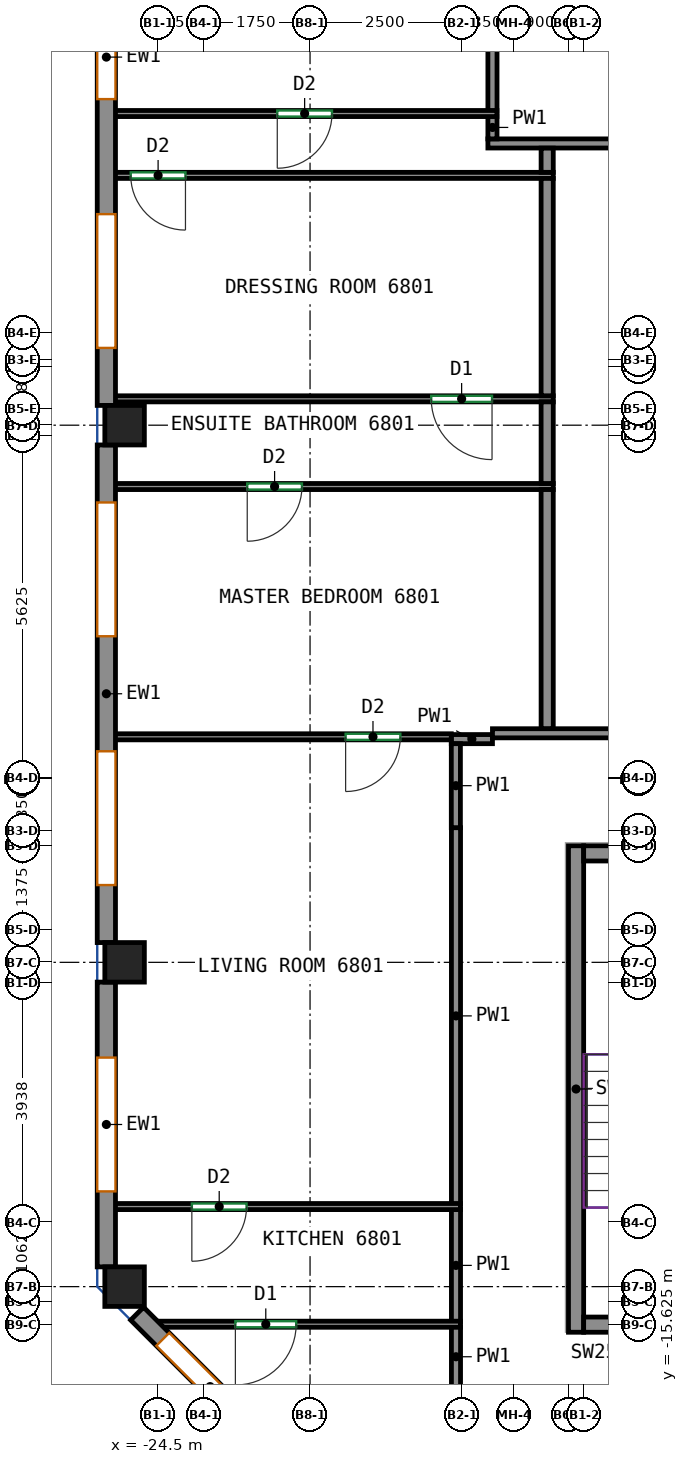
"""IFC4 building model, lengths in metres.
Left out: names, types, materials, properties, quantities, classifications, styles, units other than length and angle.
Written with IfcOpenShell. Run it as: python <this file> out.ifc"""

import sys

from ifc_helpers import new_model, si_unit, direction, frame, frame_2d, origin, origin_2d, place, context, subcontext, project, spatial, rectangle, extrude, source, transform, mapped, element, fill, save


model = new_model("IFC4")
c1 = context("Model", 3, precision=1e-05, world=origin(), true_north=direction((0.0, 1.0)))
c2 = subcontext(c1, "Body", "Model", "MODEL_VIEW")
j1 = project(units=[si_unit("LENGTHUNIT", "METRE"), si_unit("PLANEANGLEUNIT", "RADIAN")], contexts=[c1])
p1 = place(None, origin())
s1 = spatial("IfcSite", under=j1, at=p1, CompositionType="ELEMENT")
p2 = place(p1, origin())
s2 = spatial("IfcBuilding", under=s1, at=p2, CompositionType="ELEMENT")
p3 = place(p2, frame((0.0, 0.0, 277.2)))
s3 = spatial("IfcBuildingStorey", under=s2, at=p3, CompositionType="ELEMENT", Elevation=277.2)
m1 = source(origin(), c2, "Body", "SweptSolid", [
    extrude(rectangle(XDim=0.65, YDim=0.65, at=origin_2d()), origin(), (0.0, 0.0, 1.0), 3.12),
])
for number, where, z_axis, x_axis in (
    (1, (-25.05, -15.0, 0.0), (0.0, 0.0, 1.0), (1.0, 0.0, 0.0)),
    (2, (-25.05, -9.667, 0.0), (0.0, 0.0, 1.0), (1.0, 0.0, 0.0)),
    (3, (-25.05, -0.833, 0.0), (0.0, 0.0, 1.0), (1.0, 0.0, 0.0)),
):
    element("IfcColumn", number, at=place(p3, frame(where, z_axis=z_axis, x_axis=x_axis)), inside=s3, PredefinedType="COLUMN", context=c2, shape_type="MappedRepresentation", body=[
        mapped(m1, transform((0.0, 0.0, 0.0))),
    ])
m2 = source(origin(), c2, "Body", "SweptSolid", [
    extrude(rectangle(XDim=8.0, YDim=0.25, at=frame_2d((4.0, 0.0))), origin(), (0.0, 0.0, 1.0), 3.12),
])
p4 = place(p3, frame((-17.625, -15.75, 0.0), z_axis=(0.0, 0.0, 1.0), x_axis=(0.0, 1.0, 0.0)))
e4 = element("IfcWall", 4, at=p4, inside=s3, PredefinedType="SHEAR", context=c2, shape_type="MappedRepresentation", body=[
    mapped(m2, transform((0.0, 0.0, 0.0))),
])
m3 = source(origin(), c2, "Body", "SweptSolid", [
    extrude(rectangle(XDim=3.7, YDim=0.25, at=frame_2d((1.85, 0.0))), origin(), (0.0, 0.0, 1.0), 3.12),
])
p5 = place(p3, frame((-17.5, -15.625, 0.0), z_axis=(0.0, 0.0, 1.0), x_axis=(1.0, 0.0, 0.0)))
e5 = element("IfcWall", 5, at=p5, inside=s3, PredefinedType="SHEAR", context=c2, shape_type="MappedRepresentation", body=[
    mapped(m3, transform((0.0, 0.0, 0.0))),
])
p6 = place(p5, frame((1.25, 0.0, 0.0)))
e6 = element("IfcOpeningElement", 6, at=p6, cuts=e5, PredefinedType="OPENING", context=c2, shape_type="SweptSolid", body=[
    extrude(rectangle(XDim=1.2, YDim=2.1, at=frame_2d((0.6, 1.05))), frame((0.0, 0.135, 0.0), z_axis=(0.0, -1.0, 0.0), x_axis=(1.0, 0.0, 0.0)), (0.0, 0.0, 1.0), 0.27),
])
p7 = place(p3, frame((-17.5, -7.875, 0.0), z_axis=(0.0, 0.0, 1.0), x_axis=(1.0, 0.0, 0.0)))
e7 = element("IfcWall", 7, at=p7, inside=s3, PredefinedType="SHEAR", context=c2, shape_type="MappedRepresentation", body=[
    mapped(m3, transform((0.0, 0.0, 0.0))),
])
m4 = source(origin(), c2, "Body", "SweptSolid", [
    extrude(rectangle(XDim=8.183, YDim=0.3, at=frame_2d((4.092, 0.0))), origin(), (0.0, 0.0, 1.0), 3.12),
])
p8 = place(p3, frame((-25.35, 7.675, 0.0), z_axis=(0.0, 0.0, 1.0), x_axis=(0.0, -1.0, 0.0)))
e8 = element("IfcWall", 8, at=p8, inside=s3, PredefinedType="SOLIDWALL", context=c2, shape_type="MappedRepresentation", body=[
    mapped(m4, transform((0.0, 0.0, 0.0))),
])
p9 = place(p8, frame((0.946, 0.0, 0.8)))
e9 = element("IfcOpeningElement", 9, at=p9, cuts=e8, PredefinedType="OPENING", context=c2, shape_type="SweptSolid", body=[
    extrude(rectangle(XDim=2.2, YDim=2.05, at=frame_2d((1.1, 1.025))), frame((0.0, 0.16, 0.0), z_axis=(0.0, -1.0, 0.0), x_axis=(1.0, 0.0, 0.0)), (0.0, 0.0, 1.0), 0.32),
])
p10 = place(p8, frame((5.037, 0.0, 0.8)))
e10 = element("IfcOpeningElement", 10, at=p10, cuts=e8, PredefinedType="OPENING", context=c2, shape_type="SweptSolid", body=[
    extrude(rectangle(XDim=2.2, YDim=2.05, at=frame_2d((1.1, 1.025))), frame((0.0, 0.16, 0.0), z_axis=(0.0, -1.0, 0.0), x_axis=(1.0, 0.0, 0.0)), (0.0, 0.0, 1.0), 0.32),
])
m5 = source(origin(), c2, "Body", "SweptSolid", [
    extrude(rectangle(XDim=8.184, YDim=0.3, at=frame_2d((4.092, 0.0))), origin(), (0.0, 0.0, 1.0), 3.12),
])
p11 = place(p3, frame((-25.35, -1.158, 0.0), z_axis=(0.0, 0.0, 1.0), x_axis=(0.0, -1.0, 0.0)))
e11 = element("IfcWall", 11, at=p11, inside=s3, PredefinedType="SOLIDWALL", context=c2, shape_type="MappedRepresentation", body=[
    mapped(m5, transform((0.0, 0.0, 0.0))),
])
p12 = place(p11, frame((0.946, 0.0, 0.8)))
e12 = element("IfcOpeningElement", 12, at=p12, cuts=e11, PredefinedType="OPENING", context=c2, shape_type="SweptSolid", body=[
    extrude(rectangle(XDim=2.2, YDim=2.05, at=frame_2d((1.1, 1.025))), frame((0.0, 0.16, 0.0), z_axis=(0.0, -1.0, 0.0), x_axis=(1.0, 0.0, 0.0)), (0.0, 0.0, 1.0), 0.32),
])
p13 = place(p11, frame((5.038, 0.0, 0.8)))
e13 = element("IfcOpeningElement", 13, at=p13, cuts=e11, PredefinedType="OPENING", context=c2, shape_type="SweptSolid", body=[
    extrude(rectangle(XDim=2.2, YDim=2.05, at=frame_2d((1.1, 1.025))), frame((0.0, 0.16, 0.0), z_axis=(0.0, -1.0, 0.0), x_axis=(1.0, 0.0, 0.0)), (0.0, 0.0, 1.0), 0.32),
])
m6 = source(origin(), c2, "Body", "SweptSolid", [
    extrude(rectangle(XDim=4.683, YDim=0.3, at=frame_2d((2.342, 0.0))), origin(), (0.0, 0.0, 1.0), 3.12),
])
p14 = place(p3, frame((-25.35, -9.992, 0.0), z_axis=(0.0, 0.0, 1.0), x_axis=(0.0, -1.0, 0.0)))
e14 = element("IfcWall", 14, at=p14, inside=s3, PredefinedType="SOLIDWALL", context=c2, shape_type="MappedRepresentation", body=[
    mapped(m6, transform((0.0, 0.0, 0.0))),
])
p15 = place(p14, frame((1.242, 0.0, 0.8)))
e15 = element("IfcOpeningElement", 15, at=p15, cuts=e14, PredefinedType="OPENING", context=c2, shape_type="SweptSolid", body=[
    extrude(rectangle(XDim=2.2, YDim=2.05, at=frame_2d((1.1, 1.025))), frame((0.0, 0.16, 0.0), z_axis=(0.0, -1.0, 0.0), x_axis=(1.0, 0.0, 0.0)), (0.0, 0.0, 1.0), 0.32),
])
m7 = source(origin(), c2, "Body", "SweptSolid", [
    extrude(rectangle(XDim=3.394, YDim=0.3, at=frame_2d((1.697, 0.0))), origin(), (0.0, 0.0, 1.0), 3.12),
])
p16 = place(p3, frame((-24.844, -15.444, 0.0), z_axis=(0.0, 0.0, 1.0), x_axis=(0.707070815327, -0.707142745217, 0.0)))
e16 = element("IfcWall", 16, at=p16, inside=s3, PredefinedType="SOLIDWALL", context=c2, shape_type="MappedRepresentation", body=[
    mapped(m7, transform((0.0, 0.0, 0.0))),
])
p17 = place(p16, frame((0.597, 0.0, 0.8)))
e17 = element("IfcOpeningElement", 17, at=p17, cuts=e16, PredefinedType="OPENING", context=c2, shape_type="SweptSolid", body=[
    extrude(rectangle(XDim=2.2, YDim=2.05, at=frame_2d((1.1, 1.025))), frame((0.0, 0.16, 0.0), z_axis=(0.0, -1.0, 0.0), x_axis=(1.0, 0.0, 0.0)), (0.0, 0.0, 1.0), 0.32),
])
p18 = place(p3, frame((-19.6, -16.648, 0.0), z_axis=(0.0, 0.0, 1.0), x_axis=(0.0, 1.0, 0.0)))
e18 = element("IfcWall", 18, at=p18, inside=s3, PredefinedType="PARTITIONING", context=c2, shape_type="SweptSolid", body=[
    extrude(rectangle(XDim=0.99, YDim=0.15, at=frame_2d((0.495, 0.0))), origin(), (0.0, 0.0, 1.0), 3.12),
])
p19 = place(p3, frame((-19.6, -15.578, 0.0), z_axis=(0.0, 0.0, 1.0), x_axis=(0.0, 1.0, 0.0)))
e19 = element("IfcWall", 19, at=p19, inside=s3, PredefinedType="PARTITIONING", context=c2, shape_type="SweptSolid", body=[
    extrude(rectangle(XDim=1.855, YDim=0.15, at=frame_2d((0.927, 0.0))), origin(), (0.0, 0.0, 1.0), 3.12),
])
p20 = place(p3, frame((-19.0, -5.996, 0.0), z_axis=(0.0, 0.0, 1.0), x_axis=(-1.0, 0.0, 0.0)))
e20 = element("IfcWall", 20, at=p20, inside=s3, PredefinedType="PARTITIONING", context=c2, shape_type="SweptSolid", body=[
    extrude(rectangle(XDim=0.677, YDim=0.15, at=frame_2d((0.338, 0.0))), origin(), (0.0, 0.0, 1.0), 3.12),
])
p21 = place(p3, frame((-19.6, -13.643, 0.0), z_axis=(0.0, 0.0, 1.0), x_axis=(0.0, 1.0, 0.0)))
e21 = element("IfcWall", 21, at=p21, inside=s3, PredefinedType="PARTITIONING", context=c2, shape_type="SweptSolid", body=[
    extrude(rectangle(XDim=6.191, YDim=0.15, at=frame_2d((3.096, 0.0))), origin(), (0.0, 0.0, 1.0), 3.12),
])
p22 = place(p3, frame((-19.602, -7.452, 0.0), z_axis=(0.0, 0.0, 1.0), x_axis=(0.0, 1.0, 0.0)))
e22 = element("IfcWall", 22, at=p22, inside=s3, PredefinedType="PARTITIONING", context=c2, shape_type="SweptSolid", body=[
    extrude(rectangle(XDim=1.381, YDim=0.15, at=frame_2d((0.69, 0.0))), origin(), (0.0, 0.0, 1.0), 3.12),
])
p23 = place(p3, frame((-19.0, -5.9, 0.0), z_axis=(0.0, 0.0, 1.0), x_axis=(1.0, 0.0, 0.0)))
e23 = element("IfcWall", 23, at=p23, inside=s3, PredefinedType="PARTITIONING", context=c2, shape_type="SweptSolid", body=[
    extrude(rectangle(XDim=25.655, YDim=0.15, at=frame_2d((12.828, 0.0))), origin(), (0.0, 0.0, 1.0), 3.12),
])
p24 = place(p23, frame((4.394, 0.0, 0.0)))
e24 = element("IfcOpeningElement", 24, at=p24, cuts=e23, PredefinedType="OPENING", context=c2, shape_type="SweptSolid", body=[
    extrude(rectangle(XDim=0.9, YDim=2.1, at=frame_2d((0.45, 1.05))), frame((0.0, 0.085, 0.0), z_axis=(0.0, -1.0, 0.0), x_axis=(1.0, 0.0, 0.0)), (0.0, 0.0, 1.0), 0.17),
])
p25 = place(p3, frame((-19.075, 3.8, 0.0), z_axis=(0.0, 0.0, 1.0), x_axis=(1.0, 0.0, 0.0)))
e25 = element("IfcWall", 25, at=p25, inside=s3, PredefinedType="PARTITIONING", context=c2, shape_type="SweptSolid", body=[
    extrude(rectangle(XDim=4.89, YDim=0.15, at=frame_2d((2.445, 0.0))), origin(), (0.0, 0.0, 1.0), 3.12),
])
p26 = place(p3, frame((-19.0, 3.875, 0.0), z_axis=(0.0, 0.0, 1.0), x_axis=(0.0, 1.0, 0.0)))
e26 = element("IfcWall", 26, at=p26, inside=s3, PredefinedType="PARTITIONING", context=c2, shape_type="SweptSolid", body=[
    extrude(rectangle(XDim=0.377, YDim=0.15, at=frame_2d((0.188, 0.0))), origin(), (0.0, 0.0, 1.0), 3.12),
])
p27 = place(p3, frame((-19.0, 4.332, 0.0), z_axis=(0.0, 0.0, 1.0), x_axis=(0.0, 1.0, 0.0)))
e27 = element("IfcWall", 27, at=p27, inside=s3, PredefinedType="PARTITIONING", context=c2, shape_type="SweptSolid", body=[
    extrude(rectangle(XDim=3.578, YDim=0.15, at=frame_2d((1.789, 0.0))), origin(), (0.0, 0.0, 1.0), 3.12),
])
p28 = place(p3, frame((-19.527, -15.618, 0.0), z_axis=(0.0, 0.0, 1.0), x_axis=(-1.0, 0.0, 0.0)))
e28 = element("IfcWall", 28, at=p28, inside=s3, PredefinedType="PARTITIONING", context=c2, shape_type="SweptSolid", body=[
    extrude(rectangle(XDim=5.001, YDim=0.1, at=frame_2d((2.5, 0.0))), origin(), (0.0, 0.0, 1.0), 3.12),
])
p29 = place(p28, frame((2.701, 0.0, 0.0)))
e29 = element("IfcOpeningElement", 29, at=p29, cuts=e28, PredefinedType="OPENING", context=c2, shape_type="SweptSolid", body=[
    extrude(rectangle(XDim=1.0, YDim=2.1, at=frame_2d((0.5, 1.05))), frame((0.0, 0.06, 0.0), z_axis=(0.0, -1.0, 0.0), x_axis=(1.0, 0.0, 0.0)), (0.0, 0.0, 1.0), 0.12),
])
p30 = place(p3, frame((-19.527, -13.683, 0.0), z_axis=(0.0, 0.0, 1.0), x_axis=(-1.0, 0.0, 0.0)))
e30 = element("IfcWall", 30, at=p30, inside=s3, PredefinedType="PARTITIONING", context=c2, shape_type="SweptSolid", body=[
    extrude(rectangle(XDim=5.723, YDim=0.1, at=frame_2d((2.861, 0.0))), origin(), (0.0, 0.0, 1.0), 3.12),
])
p31 = place(p30, frame((3.517, 0.0, 0.0)))
e31 = element("IfcOpeningElement", 31, at=p31, cuts=e30, PredefinedType="OPENING", context=c2, shape_type="SweptSolid", body=[
    extrude(rectangle(XDim=0.9, YDim=2.1, at=frame_2d((0.45, 1.05))), frame((0.0, 0.06, 0.0), z_axis=(0.0, -1.0, 0.0), x_axis=(1.0, 0.0, 0.0)), (0.0, 0.0, 1.0), 0.12),
])
p32 = place(p3, frame((-19.677, -5.958, 0.0), z_axis=(0.0, 0.0, 1.0), x_axis=(-1.0, 0.0, 0.0)))
e32 = element("IfcWall", 32, at=p32, inside=s3, PredefinedType="PARTITIONING", context=c2, shape_type="SweptSolid", body=[
    extrude(rectangle(XDim=5.573, YDim=0.1, at=frame_2d((2.787, 0.0))), origin(), (0.0, 0.0, 1.0), 3.12),
])
p33 = place(p32, frame((0.838, 0.0, 0.0)))
e33 = element("IfcOpeningElement", 33, at=p33, cuts=e32, PredefinedType="OPENING", context=c2, shape_type="SweptSolid", body=[
    extrude(rectangle(XDim=0.9, YDim=2.1, at=frame_2d((0.45, 1.05))), frame((0.0, 0.06, 0.0), z_axis=(0.0, -1.0, 0.0), x_axis=(1.0, 0.0, 0.0)), (0.0, 0.0, 1.0), 0.12),
])
p34 = place(p3, frame((-18.0, -1.842, 0.0), z_axis=(0.0, 0.0, 1.0), x_axis=(-1.0, 0.0, 0.0)))
e34 = element("IfcWall", 34, at=p34, inside=s3, PredefinedType="PARTITIONING", context=c2, shape_type="SweptSolid", body=[
    extrude(rectangle(XDim=7.25, YDim=0.1, at=frame_2d((3.625, 0.0))), origin(), (0.0, 0.0, 1.0), 3.12),
])
p35 = place(p34, frame((4.133, 0.0, 0.0)))
e35 = element("IfcOpeningElement", 35, at=p35, cuts=e34, PredefinedType="OPENING", context=c2, shape_type="SweptSolid", body=[
    extrude(rectangle(XDim=0.9, YDim=2.1, at=frame_2d((0.45, 1.05))), frame((0.0, 0.06, 0.0), z_axis=(0.0, -1.0, 0.0), x_axis=(1.0, 0.0, 0.0)), (0.0, 0.0, 1.0), 0.12),
])
p36 = place(p3, frame((-18.1, -5.823, 0.0), z_axis=(0.0, 0.0, 1.0), x_axis=(0.0, 1.0, 0.0)))
e36 = element("IfcWall", 36, at=p36, inside=s3, PredefinedType="PARTITIONING", context=c2, shape_type="SweptSolid", body=[
    extrude(rectangle(XDim=3.931, YDim=0.2, at=frame_2d((1.965, 0.0))), origin(), (0.0, 0.0, 1.0), 3.12),
])
p37 = place(p3, frame((-18.0, -0.4, 0.0), z_axis=(0.0, 0.0, 1.0), x_axis=(-1.0, 0.0, 0.0)))
e37 = element("IfcWall", 37, at=p37, inside=s3, PredefinedType="PARTITIONING", context=c2, shape_type="SweptSolid", body=[
    extrude(rectangle(XDim=7.25, YDim=0.1, at=frame_2d((3.625, 0.0))), origin(), (0.0, 0.0, 1.0), 3.12),
])
p38 = place(p37, frame((1.007, 0.0, 0.0)))
e38 = element("IfcOpeningElement", 38, at=p38, cuts=e37, PredefinedType="OPENING", context=c2, shape_type="SweptSolid", body=[
    extrude(rectangle(XDim=1.0, YDim=2.1, at=frame_2d((0.5, 1.05))), frame((0.0, 0.06, 0.0), z_axis=(0.0, -1.0, 0.0), x_axis=(1.0, 0.0, 0.0)), (0.0, 0.0, 1.0), 0.12),
])
p39 = place(p3, frame((-18.1, -1.792, 0.0), z_axis=(0.0, 0.0, 1.0), x_axis=(0.0, 1.0, 0.0)))
e39 = element("IfcWall", 39, at=p39, inside=s3, PredefinedType="PARTITIONING", context=c2, shape_type="SweptSolid", body=[
    extrude(rectangle(XDim=1.342, YDim=0.2, at=frame_2d((0.671, 0.0))), origin(), (0.0, 0.0, 1.0), 3.12),
])
p40 = place(p3, frame((-18.0, 3.275, 0.0), z_axis=(0.0, 0.0, 1.0), x_axis=(-1.0, 0.0, 0.0)))
e40 = element("IfcWall", 40, at=p40, inside=s3, PredefinedType="PARTITIONING", context=c2, shape_type="SweptSolid", body=[
    extrude(rectangle(XDim=7.25, YDim=0.1, at=frame_2d((3.625, 0.0))), origin(), (0.0, 0.0, 1.0), 3.12),
])
p41 = place(p40, frame((6.049, 0.0, 0.0)))
e41 = element("IfcOpeningElement", 41, at=p41, cuts=e40, PredefinedType="OPENING", context=c2, shape_type="SweptSolid", body=[
    extrude(rectangle(XDim=0.9, YDim=2.1, at=frame_2d((0.45, 1.05))), frame((0.0, 0.06, 0.0), z_axis=(0.0, -1.0, 0.0), x_axis=(1.0, 0.0, 0.0)), (0.0, 0.0, 1.0), 0.12),
])
p42 = place(p3, frame((-18.1, -0.35, 0.0), z_axis=(0.0, 0.0, 1.0), x_axis=(0.0, 1.0, 0.0)))
e42 = element("IfcWall", 42, at=p42, inside=s3, PredefinedType="PARTITIONING", context=c2, shape_type="SweptSolid", body=[
    extrude(rectangle(XDim=3.575, YDim=0.2, at=frame_2d((1.788, 0.0))), origin(), (0.0, 0.0, 1.0), 3.12),
])
p43 = place(p3, frame((-18.927, 4.292, 0.0), z_axis=(0.0, 0.0, 1.0), x_axis=(-1.0, 0.0, 0.0)))
e43 = element("IfcWall", 43, at=p43, inside=s3, PredefinedType="PARTITIONING", context=c2, shape_type="SweptSolid", body=[
    extrude(rectangle(XDim=6.323, YDim=0.1, at=frame_2d((3.162, 0.0))), origin(), (0.0, 0.0, 1.0), 3.12),
])
p44 = place(p43, frame((2.712, 0.0, 0.0)))
e44 = element("IfcOpeningElement", 44, at=p44, cuts=e43, PredefinedType="OPENING", context=c2, shape_type="SweptSolid", body=[
    extrude(rectangle(XDim=0.9, YDim=2.1, at=frame_2d((0.45, 1.05))), frame((0.0, 0.06, 0.0), z_axis=(0.0, -1.0, 0.0), x_axis=(1.0, 0.0, 0.0)), (0.0, 0.0, 1.0), 0.12),
])
p45 = place(p3, frame((-18.1, 3.325, 0.0), z_axis=(0.0, 0.0, 1.0), x_axis=(0.0, 1.0, 0.0)))
e45 = element("IfcWall", 45, at=p45, inside=s3, PredefinedType="PARTITIONING", context=c2, shape_type="SweptSolid", body=[
    extrude(rectangle(XDim=0.398, YDim=0.2, at=frame_2d((0.199, 0.0))), origin(), (0.0, 0.0, 1.0), 3.12),
])
p46 = place(p9, origin())
e46 = element("IfcWindow", 46, at=p46, inside=s3, PartitioningType="SINGLE_PANEL", PredefinedType="WINDOW", context=c2, shape_type="SweptSolid", body=[
    extrude(rectangle(XDim=2.2, YDim=2.05, at=frame_2d((1.1, 1.025))), frame((0.0, 0.03, 0.0), z_axis=(0.0, -1.0, 0.0), x_axis=(1.0, 0.0, 0.0)), (0.0, 0.0, 1.0), 0.06),
])
fill(e9, e46)
p47 = place(p10, origin())
e47 = element("IfcWindow", 47, at=p47, inside=s3, PartitioningType="SINGLE_PANEL", PredefinedType="WINDOW", context=c2, shape_type="SweptSolid", body=[
    extrude(rectangle(XDim=2.2, YDim=2.05, at=frame_2d((1.1, 1.025))), frame((0.0, 0.03, 0.0), z_axis=(0.0, -1.0, 0.0), x_axis=(1.0, 0.0, 0.0)), (0.0, 0.0, 1.0), 0.06),
])
fill(e10, e47)
p48 = place(p12, origin())
e48 = element("IfcWindow", 48, at=p48, inside=s3, PartitioningType="SINGLE_PANEL", PredefinedType="WINDOW", context=c2, shape_type="SweptSolid", body=[
    extrude(rectangle(XDim=2.2, YDim=2.05, at=frame_2d((1.1, 1.025))), frame((0.0, 0.03, 0.0), z_axis=(0.0, -1.0, 0.0), x_axis=(1.0, 0.0, 0.0)), (0.0, 0.0, 1.0), 0.06),
])
fill(e12, e48)
p49 = place(p13, origin())
e49 = element("IfcWindow", 49, at=p49, inside=s3, PartitioningType="SINGLE_PANEL", PredefinedType="WINDOW", context=c2, shape_type="SweptSolid", body=[
    extrude(rectangle(XDim=2.2, YDim=2.05, at=frame_2d((1.1, 1.025))), frame((0.0, 0.03, 0.0), z_axis=(0.0, -1.0, 0.0), x_axis=(1.0, 0.0, 0.0)), (0.0, 0.0, 1.0), 0.06),
])
fill(e13, e49)
p50 = place(p15, origin())
e50 = element("IfcWindow", 50, at=p50, inside=s3, PartitioningType="SINGLE_PANEL", PredefinedType="WINDOW", context=c2, shape_type="SweptSolid", body=[
    extrude(rectangle(XDim=2.2, YDim=2.05, at=frame_2d((1.1, 1.025))), frame((0.0, 0.03, 0.0), z_axis=(0.0, -1.0, 0.0), x_axis=(1.0, 0.0, 0.0)), (0.0, 0.0, 1.0), 0.06),
])
fill(e15, e50)
p51 = place(p17, origin())
e51 = element("IfcWindow", 51, at=p51, inside=s3, PartitioningType="SINGLE_PANEL", PredefinedType="WINDOW", context=c2, shape_type="SweptSolid", body=[
    extrude(rectangle(XDim=2.2, YDim=2.05, at=frame_2d((1.1, 1.025))), frame((0.0, 0.03, 0.0), z_axis=(0.0, -1.0, 0.0), x_axis=(1.0, 0.0, 0.0)), (0.0, 0.0, 1.0), 0.06),
])
fill(e17, e51)
p52 = place(p29, origin())
e52 = element("IfcDoor", 52, at=p52, inside=s3, OperationType="SINGLE_SWING_RIGHT", PredefinedType="DOOR", context=c2, shape_type="SweptSolid", body=[
    extrude(rectangle(XDim=1.0, YDim=2.1, at=frame_2d((0.5, 1.05))), frame((0.0, 0.025, 0.0), z_axis=(0.0, -1.0, 0.0), x_axis=(1.0, 0.0, 0.0)), (0.0, 0.0, 1.0), 0.05),
])
fill(e29, e52)
p53 = place(p31, origin())
e53 = element("IfcDoor", 53, at=p53, inside=s3, OperationType="SINGLE_SWING_RIGHT", PredefinedType="DOOR", context=c2, shape_type="SweptSolid", body=[
    extrude(rectangle(XDim=0.9, YDim=2.1, at=frame_2d((0.45, 1.05))), frame((0.0, 0.025, 0.0), z_axis=(0.0, -1.0, 0.0), x_axis=(1.0, 0.0, 0.0)), (0.0, 0.0, 1.0), 0.05),
])
fill(e31, e53)
p54 = place(p33, origin())
e54 = element("IfcDoor", 54, at=p54, inside=s3, OperationType="SINGLE_SWING_RIGHT", PredefinedType="DOOR", context=c2, shape_type="SweptSolid", body=[
    extrude(rectangle(XDim=0.9, YDim=2.1, at=frame_2d((0.45, 1.05))), frame((0.0, 0.025, 0.0), z_axis=(0.0, -1.0, 0.0), x_axis=(1.0, 0.0, 0.0)), (0.0, 0.0, 1.0), 0.05),
])
fill(e33, e54)
p55 = place(p35, origin())
e55 = element("IfcDoor", 55, at=p55, inside=s3, OperationType="SINGLE_SWING_RIGHT", PredefinedType="DOOR", context=c2, shape_type="SweptSolid", body=[
    extrude(rectangle(XDim=0.9, YDim=2.1, at=frame_2d((0.45, 1.05))), frame((0.0, 0.025, 0.0), z_axis=(0.0, -1.0, 0.0), x_axis=(1.0, 0.0, 0.0)), (0.0, 0.0, 1.0), 0.05),
])
fill(e35, e55)
p56 = place(p38, origin())
e56 = element("IfcDoor", 56, at=p56, inside=s3, OperationType="SINGLE_SWING_LEFT", PredefinedType="DOOR", context=c2, shape_type="SweptSolid", body=[
    extrude(rectangle(XDim=1.0, YDim=2.1, at=frame_2d((0.5, 1.05))), frame((0.0, 0.025, 0.0), z_axis=(0.0, -1.0, 0.0), x_axis=(1.0, 0.0, 0.0)), (0.0, 0.0, 1.0), 0.05),
])
fill(e38, e56)
p57 = place(p41, origin())
e57 = element("IfcDoor", 57, at=p57, inside=s3, OperationType="SINGLE_SWING_LEFT", PredefinedType="DOOR", context=c2, shape_type="SweptSolid", body=[
    extrude(rectangle(XDim=0.9, YDim=2.1, at=frame_2d((0.45, 1.05))), frame((0.0, 0.025, 0.0), z_axis=(0.0, -1.0, 0.0), x_axis=(1.0, 0.0, 0.0)), (0.0, 0.0, 1.0), 0.05),
])
fill(e41, e57)
p58 = place(p44, origin())
e58 = element("IfcDoor", 58, at=p58, inside=s3, OperationType="SINGLE_SWING_RIGHT", PredefinedType="DOOR", context=c2, shape_type="SweptSolid", body=[
    extrude(rectangle(XDim=0.9, YDim=2.1, at=frame_2d((0.45, 1.05))), frame((0.0, 0.025, 0.0), z_axis=(0.0, -1.0, 0.0), x_axis=(1.0, 0.0, 0.0)), (0.0, 0.0, 1.0), 0.05),
])
fill(e44, e58)
save(model, sys.argv[1])
